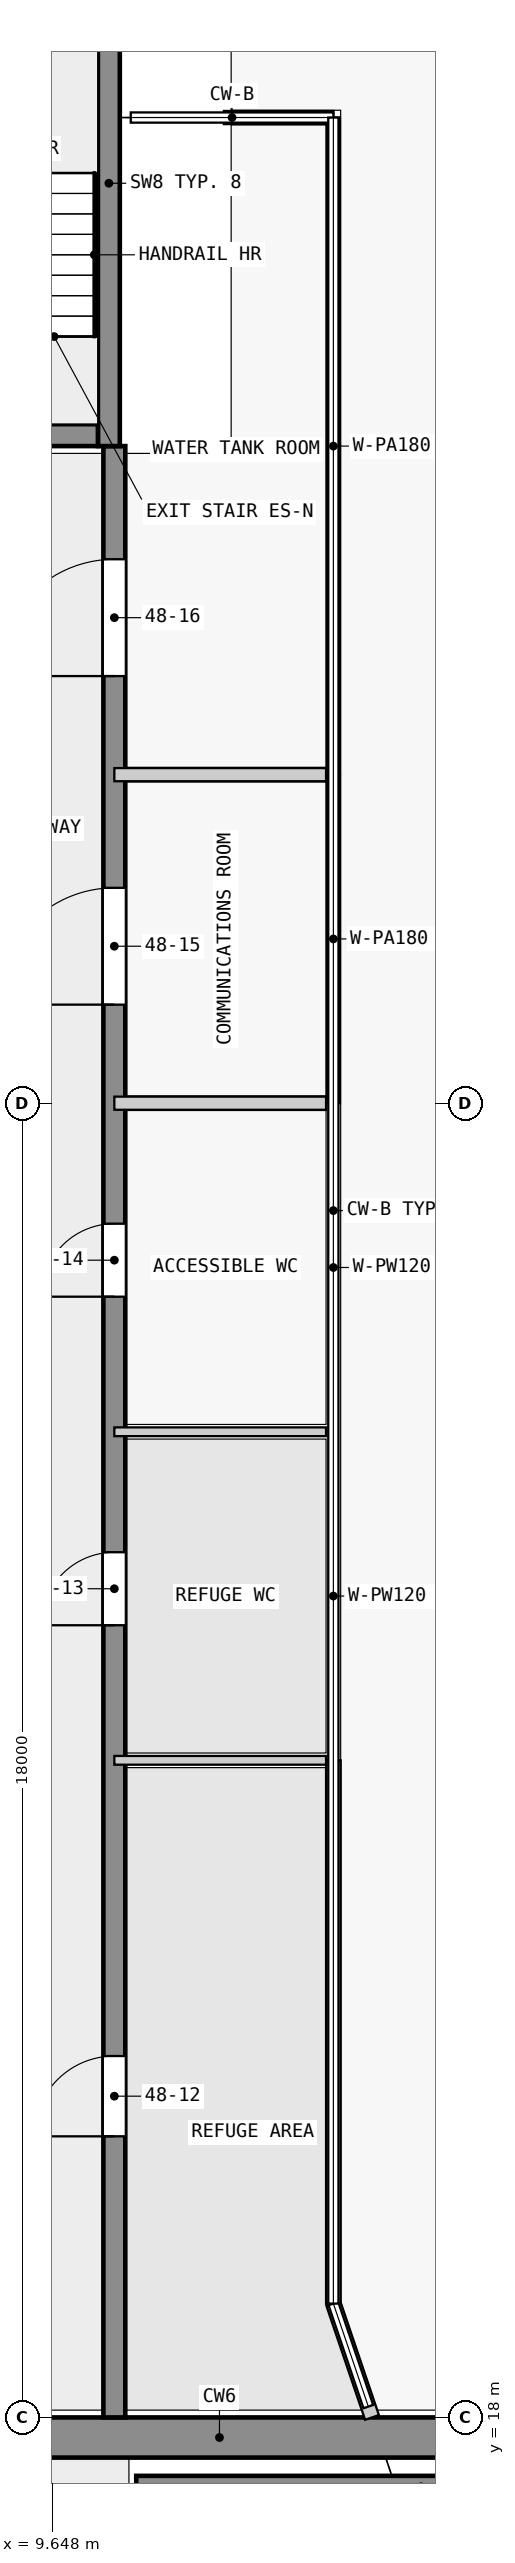
"""IFC4 building model, lengths in metres.
Left out: names, types, materials, properties, quantities, classifications, styles, units other than length and angle.
Written with IfcOpenShell. Run it as: python <this file> out.ifc"""

import sys

from ifc_helpers import new_model, si_unit, direction, frame, frame_2d, origin, place, context, subcontext, project, spatial, rectangle, extrude, element, fill, save


model = new_model("IFC4")
c1 = context("Model", 3, precision=1e-05, world=origin(), true_north=direction((0.0, 1.0)))
c2 = subcontext(c1, "Body", "Model", "MODEL_VIEW")
j1 = project(units=[si_unit("LENGTHUNIT", "METRE"), si_unit("PLANEANGLEUNIT", "RADIAN")], contexts=[c1])
p1 = place(None, origin())
s1 = spatial("IfcSite", under=j1, at=p1, CompositionType="ELEMENT")
p2 = place(p1, origin())
s2 = spatial("IfcBuilding", under=s1, at=p2, CompositionType="ELEMENT")
p3 = place(p2, frame((0.0, 0.0, 184.9)))
s3 = spatial("IfcBuildingStorey", under=s2, at=p3, CompositionType="ELEMENT", Elevation=184.9)
p4 = place(p3, frame((1.38, 17.725, 0.0), z_axis=(0.0, 0.0, 1.0), x_axis=(1.0, 0.0, 0.0)))
e1 = element("IfcWall", 1, at=p4, inside=s3, PredefinedType="SHEAR", context=c2, shape_type="SweptSolid", body=[
    extrude(rectangle(XDim=21.12, YDim=0.55, at=frame_2d((10.56, 0.0))), origin(), (0.0, 0.0, 1.0), 5.75),
])
p5 = place(p4, frame((6.35, 0.0, 0.0)))
e2 = element("IfcOpeningElement", 2, at=p5, cuts=e1, PredefinedType="OPENING", context=c2, shape_type="SweptSolid", body=[
    extrude(rectangle(XDim=1.8, YDim=2.1, at=frame_2d((0.9, 1.05))), frame((0.0, 0.285, 0.0), z_axis=(0.0, -1.0, 0.0), x_axis=(1.0, 0.0, 0.0)), (0.0, 0.0, 1.0), 0.57),
])
p6 = place(p3, frame((10.8, 17.05, 0.0), z_axis=(0.0, 0.0, 1.0), x_axis=(1.0, 0.0, 0.0)))
e3 = element("IfcWall", 3, at=p6, inside=s3, PredefinedType="SHEAR", context=c2, shape_type="SweptSolid", body=[
    extrude(rectangle(XDim=7.8, YDim=0.3, at=frame_2d((3.9, 0.0))), origin(), (0.0, 0.0, 1.0), 5.75),
])
p7 = place(p3, frame((7.725, 45.15, 0.0), z_axis=(0.0, 0.0, 1.0), x_axis=(1.0, 0.0, 0.0)))
e4 = element("IfcWall", 4, at=p7, inside=s3, PredefinedType="SHEAR", context=c2, shape_type="SweptSolid", body=[
    extrude(rectangle(XDim=2.55, YDim=0.3, at=frame_2d((1.275, 0.0))), origin(), (0.0, 0.0, 1.0), 6.0),
])
p8 = place(p7, frame((0.725, 0.0, 0.0)))
e5 = element("IfcOpeningElement", 5, at=p8, cuts=e4, PredefinedType="OPENING", context=c2, shape_type="SweptSolid", body=[
    extrude(rectangle(XDim=1.1, YDim=2.1, at=frame_2d((0.55, 1.05))), frame((0.0, 0.16, 0.0), z_axis=(0.0, -1.0, 0.0), x_axis=(1.0, 0.0, 0.0)), (0.0, 0.0, 1.0), 0.32),
])
p9 = place(p3, frame((10.425, 45.0, 0.0), z_axis=(0.0, 0.0, 1.0), x_axis=(0.0, 1.0, 0.0)))
e6 = element("IfcWall", 6, at=p9, inside=s3, PredefinedType="SHEAR", context=c2, shape_type="SweptSolid", body=[
    extrude(rectangle(XDim=7.2, YDim=0.3, at=frame_2d((3.6, 0.0))), origin(), (0.0, 0.0, 1.0), 6.0),
])
p10 = place(p3, frame((10.5, 18.0, 0.0), z_axis=(0.0, 0.0, 1.0), x_axis=(0.0, 1.0, 0.0)))
e7 = element("IfcWall", 7, at=p10, inside=s3, PredefinedType="SHEAR", context=c2, shape_type="SweptSolid", body=[
    extrude(rectangle(XDim=27.0, YDim=0.3, at=frame_2d((13.5, 0.0))), origin(), (0.0, 0.0, 1.0), 5.75),
])
p11 = place(p10, frame((3.85, 0.0, 0.0)))
e8 = element("IfcOpeningElement", 8, at=p11, cuts=e7, PredefinedType="OPENING", context=c2, shape_type="SweptSolid", body=[
    extrude(rectangle(XDim=1.1, YDim=2.1, at=frame_2d((0.55, 1.05))), frame((0.0, 0.16, 0.0), z_axis=(0.0, -1.0, 0.0), x_axis=(1.0, 0.0, 0.0)), (0.0, 0.0, 1.0), 0.32),
])
p12 = place(p10, frame((10.85, 0.0, 0.0)))
e9 = element("IfcOpeningElement", 9, at=p12, cuts=e7, PredefinedType="OPENING", context=c2, shape_type="SweptSolid", body=[
    extrude(rectangle(XDim=1.0, YDim=2.1, at=frame_2d((0.5, 1.05))), frame((0.0, 0.16, 0.0), z_axis=(0.0, -1.0, 0.0), x_axis=(1.0, 0.0, 0.0)), (0.0, 0.0, 1.0), 0.32),
])
p13 = place(p10, frame((15.35, 0.0, 0.0)))
e10 = element("IfcOpeningElement", 10, at=p13, cuts=e7, PredefinedType="OPENING", context=c2, shape_type="SweptSolid", body=[
    extrude(rectangle(XDim=1.0, YDim=2.1, at=frame_2d((0.5, 1.05))), frame((0.0, 0.16, 0.0), z_axis=(0.0, -1.0, 0.0), x_axis=(1.0, 0.0, 0.0)), (0.0, 0.0, 1.0), 0.32),
])
p14 = place(p10, frame((19.35, 0.0, 0.0)))
e11 = element("IfcOpeningElement", 11, at=p14, cuts=e7, PredefinedType="OPENING", context=c2, shape_type="SweptSolid", body=[
    extrude(rectangle(XDim=1.6, YDim=2.4, at=frame_2d((0.8, 1.2))), frame((0.0, 0.16, 0.0), z_axis=(0.0, -1.0, 0.0), x_axis=(1.0, 0.0, 0.0)), (0.0, 0.0, 1.0), 0.32),
])
p15 = place(p10, frame((23.85, 0.0, 0.0)))
e12 = element("IfcOpeningElement", 12, at=p15, cuts=e7, PredefinedType="OPENING", context=c2, shape_type="SweptSolid", body=[
    extrude(rectangle(XDim=1.6, YDim=2.4, at=frame_2d((0.8, 1.2))), frame((0.0, 0.16, 0.0), z_axis=(0.0, -1.0, 0.0), x_axis=(1.0, 0.0, 0.0)), (0.0, 0.0, 1.0), 0.32),
])
p16 = place(p3, frame((13.5, 40.5, 0.0), z_axis=(0.0, 0.0, 1.0), x_axis=(0.0, 1.0, 0.0)))
e13 = element("IfcWall", 13, at=p16, inside=s3, PredefinedType="PARTITIONING", context=c2, shape_type="SweptSolid", body=[
    extrude(rectangle(XDim=9.0, YDim=0.18, at=frame_2d((4.5, 0.0))), origin(), (0.0, 0.0, 1.0), 5.75),
])
p17 = place(p3, frame((13.5, 49.5, 0.0), z_axis=(0.0, 0.0, 1.0), x_axis=(-1.0, 0.0, 0.0)))
e14 = element("IfcWall", 14, at=p17, inside=s3, PredefinedType="PARTITIONING", context=c2, shape_type="SweptSolid", body=[
    extrude(rectangle(XDim=1.5, YDim=0.18, at=frame_2d((0.75, 0.0))), origin(), (0.0, 0.0, 1.0), 5.75),
])
p18 = place(p3, frame((14.029, 18.0, 0.0), z_axis=(0.0, 0.0, 1.0), x_axis=(-0.32133908787, 0.946964197109, 0.0)))
e15 = element("IfcWall", 15, at=p18, inside=s3, PredefinedType="PARTITIONING", context=c2, shape_type="SweptSolid", body=[
    extrude(rectangle(XDim=1.646, YDim=0.2, at=frame_2d((0.823, 0.0))), origin(), (0.0, 0.0, 1.0), 5.75),
])
p19 = place(p3, frame((13.5, 19.559, 0.0), z_axis=(0.0, 0.0, 1.0), x_axis=(0.0, 1.0, 0.0)))
e16 = element("IfcWall", 16, at=p19, inside=s3, PredefinedType="PARTITIONING", context=c2, shape_type="SweptSolid", body=[
    extrude(rectangle(XDim=7.441, YDim=0.2, at=frame_2d((3.72, 0.0))), origin(), (0.0, 0.0, 1.0), 5.75),
])
p20 = place(p3, frame((13.5, 36.0, 0.0), z_axis=(0.0, 0.0, 1.0), x_axis=(0.0, 1.0, 0.0)))
e17 = element("IfcWall", 17, at=p20, inside=s3, PredefinedType="PARTITIONING", context=c2, shape_type="SweptSolid", body=[
    extrude(rectangle(XDim=4.5, YDim=0.18, at=frame_2d((2.25, 0.0))), origin(), (0.0, 0.0, 1.0), 5.75),
])
for number, where, z_axis, x_axis in (
    (18, (13.5, 31.5, 0.0), (0.0, 0.0, 1.0), (0.0, 1.0, 0.0)),
    (19, (13.5, 27.0, 0.0), (0.0, 0.0, 1.0), (0.0, 1.0, 0.0)),
):
    element("IfcWall", number, at=place(p3, frame(where, z_axis=z_axis, x_axis=x_axis)), inside=s3, PredefinedType="PARTITIONING", context=c2, shape_type="SweptSolid", body=[
        extrude(rectangle(XDim=4.5, YDim=0.12, at=frame_2d((2.25, 0.0))), origin(), (0.0, 0.0, 1.0), 5.75),
    ])
p21 = place(p3, frame((10.5, 36.0, 0.0), z_axis=(0.0, 0.0, 1.0), x_axis=(1.0, 0.0, 0.0)))
e20 = element("IfcWall", 20, at=p21, inside=s3, PredefinedType="PARTITIONING", context=c2, shape_type="SweptSolid", body=[
    extrude(rectangle(XDim=2.9, YDim=0.18, at=frame_2d((1.45, 0.0))), origin(), (0.0, 0.0, 1.0), 5.75),
])
for number, where, z_axis, x_axis in (
    (21, (10.5, 27.0, 0.0), (0.0, 0.0, 1.0), (1.0, 0.0, 0.0)),
    (22, (10.5, 31.5, 0.0), (0.0, 0.0, 1.0), (1.0, 0.0, 0.0)),
):
    element("IfcWall", number, at=place(p3, frame(where, z_axis=z_axis, x_axis=x_axis)), inside=s3, PredefinedType="PARTITIONING", context=c2, shape_type="SweptSolid", body=[
        extrude(rectangle(XDim=2.9, YDim=0.12, at=frame_2d((1.45, 0.0))), origin(), (0.0, 0.0, 1.0), 5.75),
    ])
p22 = place(p3, frame((10.5, 40.5, 0.0), z_axis=(0.0, 0.0, 1.0), x_axis=(1.0, 0.0, 0.0)))
e23 = element("IfcWall", 23, at=p22, inside=s3, PredefinedType="PARTITIONING", context=c2, shape_type="SweptSolid", body=[
    extrude(rectangle(XDim=2.9, YDim=0.18, at=frame_2d((1.45, 0.0))), origin(), (0.0, 0.0, 1.0), 5.75),
])
p23 = place(p11, origin())
e24 = element("IfcDoor", 24, at=p23, inside=s3, OperationType="SINGLE_SWING_LEFT", PredefinedType="DOOR", context=c2, shape_type="SweptSolid", body=[
    extrude(rectangle(XDim=1.1, YDim=2.1, at=frame_2d((0.55, 1.05))), frame((0.0, 0.025, 0.0), z_axis=(0.0, -1.0, 0.0), x_axis=(1.0, 0.0, 0.0)), (0.0, 0.0, 1.0), 0.05),
])
fill(e8, e24)
p24 = place(p12, origin())
e25 = element("IfcDoor", 25, at=p24, inside=s3, OperationType="SINGLE_SWING_LEFT", PredefinedType="DOOR", context=c2, shape_type="SweptSolid", body=[
    extrude(rectangle(XDim=1.0, YDim=2.1, at=frame_2d((0.5, 1.05))), frame((0.0, 0.025, 0.0), z_axis=(0.0, -1.0, 0.0), x_axis=(1.0, 0.0, 0.0)), (0.0, 0.0, 1.0), 0.05),
])
fill(e9, e25)
p25 = place(p13, origin())
e26 = element("IfcDoor", 26, at=p25, inside=s3, OperationType="SINGLE_SWING_RIGHT", PredefinedType="DOOR", context=c2, shape_type="SweptSolid", body=[
    extrude(rectangle(XDim=1.0, YDim=2.1, at=frame_2d((0.5, 1.05))), frame((0.0, 0.025, 0.0), z_axis=(0.0, -1.0, 0.0), x_axis=(1.0, 0.0, 0.0)), (0.0, 0.0, 1.0), 0.05),
])
fill(e10, e26)
p26 = place(p14, origin())
e27 = element("IfcDoor", 27, at=p26, inside=s3, OperationType="SINGLE_SWING_RIGHT", PredefinedType="DOOR", context=c2, shape_type="SweptSolid", body=[
    extrude(rectangle(XDim=1.6, YDim=2.4, at=frame_2d((0.8, 1.2))), frame((0.0, 0.025, 0.0), z_axis=(0.0, -1.0, 0.0), x_axis=(1.0, 0.0, 0.0)), (0.0, 0.0, 1.0), 0.05),
])
fill(e11, e27)
p27 = place(p15, origin())
e28 = element("IfcDoor", 28, at=p27, inside=s3, OperationType="SINGLE_SWING_RIGHT", PredefinedType="DOOR", context=c2, shape_type="SweptSolid", body=[
    extrude(rectangle(XDim=1.6, YDim=2.4, at=frame_2d((0.8, 1.2))), frame((0.0, 0.025, 0.0), z_axis=(0.0, -1.0, 0.0), x_axis=(1.0, 0.0, 0.0)), (0.0, 0.0, 1.0), 0.05),
])
fill(e12, e28)
save(model, sys.argv[1])
